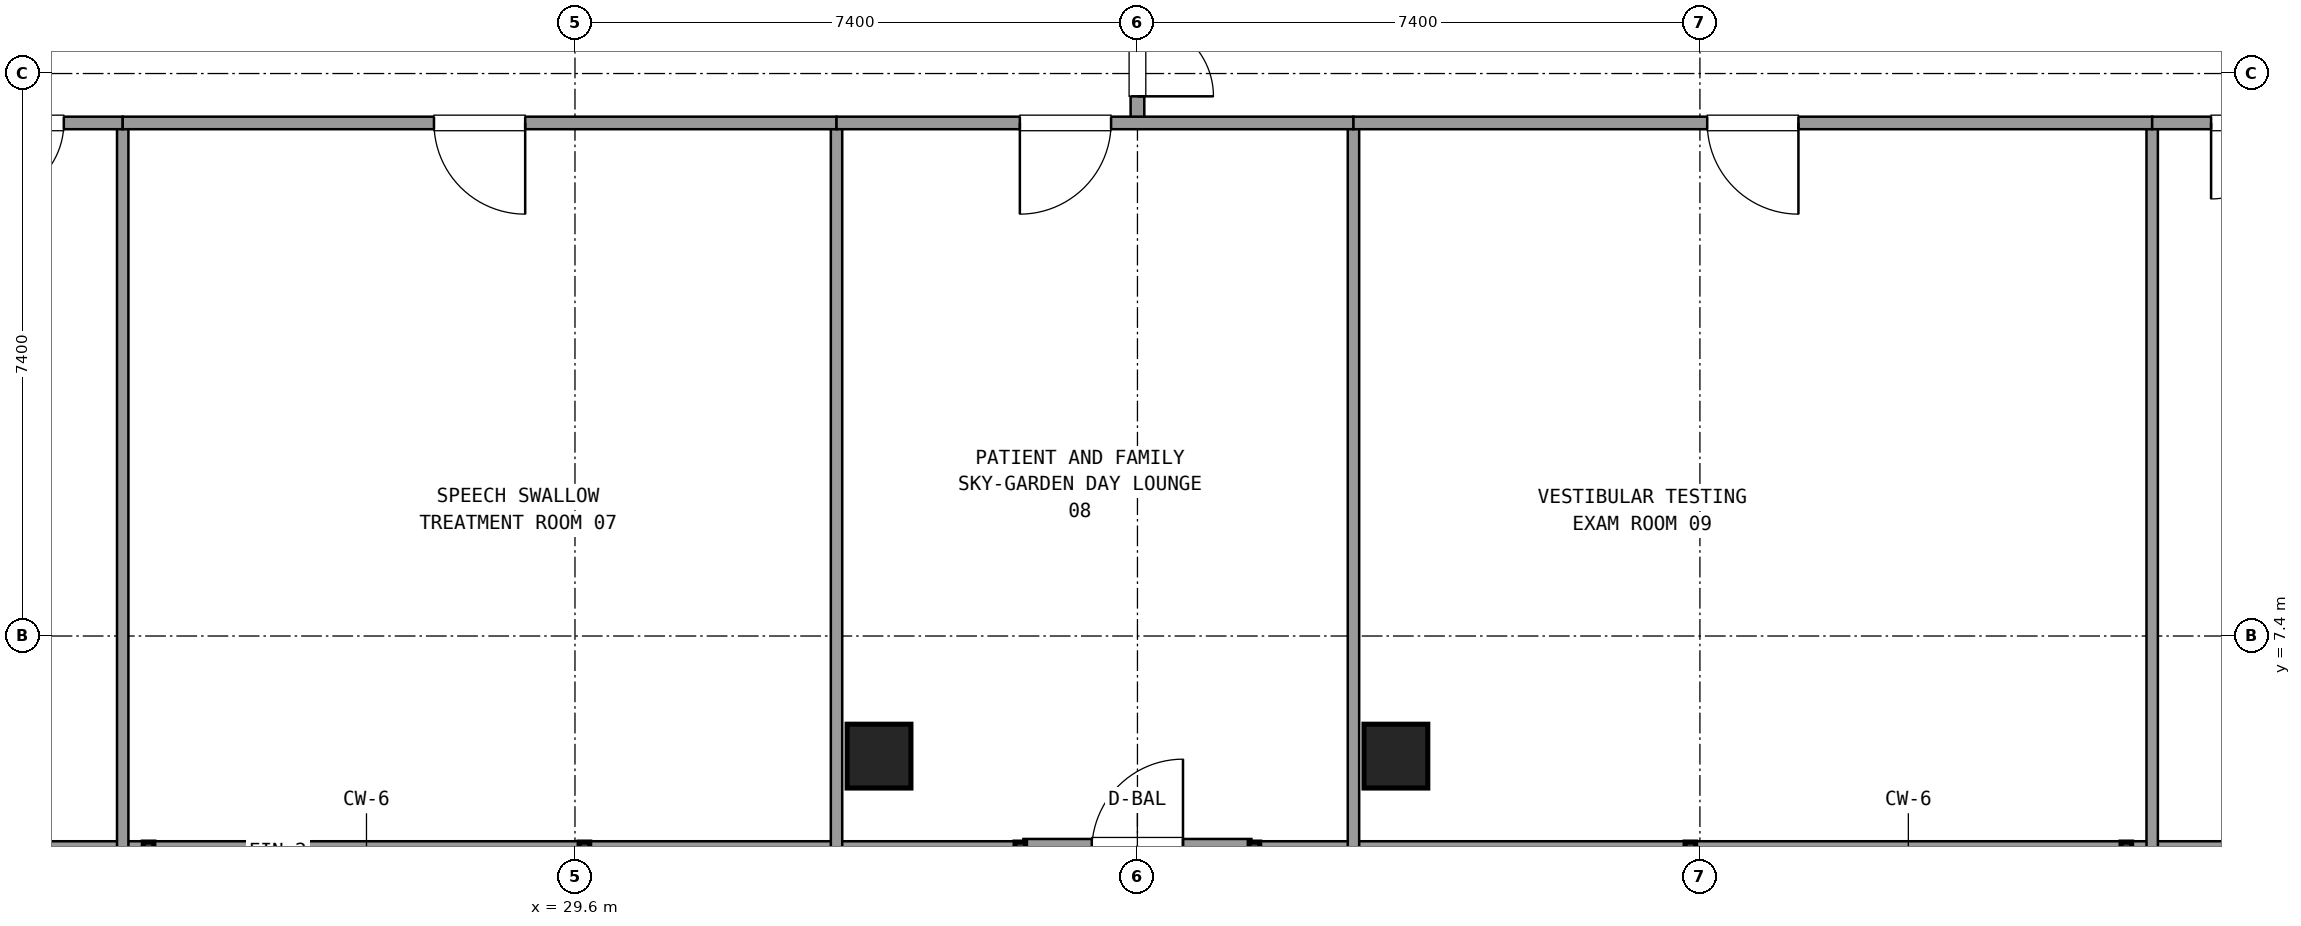
"""IFC4 building model, lengths in metres.
Left out: names, types, materials, properties, quantities, classifications, styles, units other than length and angle.
Written with IfcOpenShell. Run it as: python <this file> out.ifc"""

import sys

from ifc_helpers import new_model, si_unit, direction, frame, frame_2d, origin, origin_2d, place, context, subcontext, project, spatial, rectangle, extrude, element, fill, save


model = new_model("IFC4")
c1 = context("Model", 3, precision=1e-05, world=origin(), true_north=direction((0.0, 1.0)))
c2 = subcontext(c1, "Body", "Model", "MODEL_VIEW")
j1 = project(units=[si_unit("LENGTHUNIT", "METRE"), si_unit("PLANEANGLEUNIT", "RADIAN")], contexts=[c1])
p1 = place(None, origin())
s1 = spatial("IfcSite", under=j1, at=p1, CompositionType="ELEMENT")
p2 = place(p1, origin())
s2 = spatial("IfcBuilding", under=s1, at=p2, CompositionType="ELEMENT")
p3 = place(p2, frame((0.0, 0.0, 253.62)))
s3 = spatial("IfcBuildingStorey", under=s2, at=p3, CompositionType="ELEMENT", Elevation=253.62)
for number, where, z_axis, x_axis in (
    (1, (33.6, 5.82, 0.0), (0.0, 0.0, 1.0), (1.0, 0.0, 0.0)),
    (2, (40.4, 5.82, 0.0), (0.0, 0.0, 1.0), (1.0, 0.0, 0.0)),
):
    element("IfcColumn", number, at=place(p3, frame(where, z_axis=z_axis, x_axis=x_axis)), inside=s3, PredefinedType="COLUMN", context=c2, shape_type="SweptSolid", body=[
        extrude(rectangle(XDim=0.84, YDim=0.84, at=origin_2d()), origin(), (0.0, 0.0, 1.0), 3.6),
    ])
p4 = place(p3, frame((35.499, 4.58, 0.0), z_axis=(0.0, 0.0, 1.0), x_axis=(1.0, 0.0, 0.0)))
e3 = element("IfcWall", 3, at=p4, inside=s3, PredefinedType="SOLIDWALL", context=c2, shape_type="SweptSolid", body=[
    extrude(rectangle(XDim=3.0, YDim=0.3, at=frame_2d((1.5, 0.0))), origin(), (0.0, 0.0, 1.0), 2.69),
])
p5 = place(p4, frame((0.9, 0.0, 0.0)))
e4 = element("IfcOpeningElement", 4, at=p5, cuts=e3, PredefinedType="OPENING", context=c2, shape_type="SweptSolid", body=[
    extrude(rectangle(XDim=1.2, YDim=2.2, at=frame_2d((0.6, 1.1))), frame((0.0, 0.16, 0.0), z_axis=(0.0, -1.0, 0.0), x_axis=(1.0, 0.0, 0.0)), (0.0, 0.0, 1.0), 0.32),
])
p6 = place(p3, frame((18.255, 4.58, 0.0), z_axis=(0.0, 0.0, 1.0), x_axis=(1.0, 0.0, 0.0)))
e5 = element("IfcWall", 5, at=p6, inside=s3, PredefinedType="SOLIDWALL", context=c2, shape_type="SweptSolid", body=[
    extrude(rectangle(XDim=17.204, YDim=0.24, at=frame_2d((8.602, 0.0))), origin(), (0.0, 0.0, 1.0), 0.85),
])
p7 = place(p3, frame((38.539, 4.58, 0.0), z_axis=(0.0, 0.0, 1.0), x_axis=(1.0, 0.0, 0.0)))
e6 = element("IfcWall", 6, at=p7, inside=s3, PredefinedType="SOLIDWALL", context=c2, shape_type="SweptSolid", body=[
    extrude(rectangle(XDim=17.206, YDim=0.24, at=frame_2d((8.603, 0.0))), origin(), (0.0, 0.0, 1.0), 0.85),
])
p8 = place(p3, frame((37.0, 14.15, 0.0), z_axis=(0.0, 0.0, 1.0), x_axis=(0.0, 1.0, 0.0)))
e7 = element("IfcWall", 7, at=p8, inside=s3, PredefinedType="PARTITIONING", context=c2, shape_type="SweptSolid", body=[
    extrude(rectangle(XDim=2.7, YDim=0.18, at=frame_2d((1.35, 0.0))), origin(), (0.0, 0.0, 1.0), 2.61),
])
p9 = place(p8, frame((0.35, 0.0, 0.0)))
e8 = element("IfcOpeningElement", 8, at=p9, cuts=e7, PredefinedType="OPENING", context=c2, shape_type="SweptSolid", body=[
    extrude(rectangle(XDim=2.0, YDim=2.2, at=frame_2d((1.0, 1.1))), frame((0.0, 0.1, 0.0), z_axis=(0.0, -1.0, 0.0), x_axis=(1.0, 0.0, 0.0)), (0.0, 0.0, 1.0), 0.2),
])
p10 = place(p3, frame((23.65, 14.15, 0.0), z_axis=(0.0, 0.0, 1.0), x_axis=(0.0, -1.0, 0.0)))
e9 = element("IfcWall", 9, at=p10, inside=s3, PredefinedType="PARTITIONING", context=c2, shape_type="SweptSolid", body=[
    extrude(rectangle(XDim=9.55, YDim=0.15, at=frame_2d((4.775, 0.0))), origin(), (0.0, 0.0, 1.0), 2.61),
])
p11 = place(p3, frame((21.1, 14.15, 0.0), z_axis=(0.0, 0.0, 1.0), x_axis=(1.0, 0.0, 0.0)))
e10 = element("IfcWall", 10, at=p11, inside=s3, PredefinedType="PARTITIONING", context=c2, shape_type="SweptSolid", body=[
    extrude(rectangle(XDim=2.55, YDim=0.165, at=frame_2d((1.275, 0.0))), origin(), (0.0, 0.0, 1.0), 2.61),
])
p12 = place(p11, frame((0.775, 0.0, 0.0)))
e11 = element("IfcOpeningElement", 11, at=p12, cuts=e10, PredefinedType="OPENING", context=c2, shape_type="SweptSolid", body=[
    extrude(rectangle(XDim=1.0, YDim=2.15, at=frame_2d((0.5, 1.075))), frame((0.0, 0.093, 0.0), z_axis=(0.0, -1.0, 0.0), x_axis=(1.0, 0.0, 0.0)), (0.0, 0.0, 1.0), 0.185),
])
p13 = place(p3, frame((33.041, 14.15, 0.0), z_axis=(0.0, 0.0, 1.0), x_axis=(0.0, -1.0, 0.0)))
e12 = element("IfcWall", 12, at=p13, inside=s3, PredefinedType="PARTITIONING", context=c2, shape_type="SweptSolid", body=[
    extrude(rectangle(XDim=9.55, YDim=0.15, at=frame_2d((4.775, 0.0))), origin(), (0.0, 0.0, 1.0), 2.61),
])
p14 = place(p3, frame((23.65, 14.15, 0.0), z_axis=(0.0, 0.0, 1.0), x_axis=(1.0, 0.0, 0.0)))
e13 = element("IfcWall", 13, at=p14, inside=s3, PredefinedType="PARTITIONING", context=c2, shape_type="SweptSolid", body=[
    extrude(rectangle(XDim=9.391, YDim=0.165, at=frame_2d((4.696, 0.0))), origin(), (0.0, 0.0, 1.0), 2.61),
])
p15 = place(p14, frame((4.095, 0.0, 0.0)))
e14 = element("IfcOpeningElement", 14, at=p15, cuts=e13, PredefinedType="OPENING", context=c2, shape_type="SweptSolid", body=[
    extrude(rectangle(XDim=1.2, YDim=2.15, at=frame_2d((0.6, 1.075))), frame((0.0, 0.093, 0.0), z_axis=(0.0, -1.0, 0.0), x_axis=(1.0, 0.0, 0.0)), (0.0, 0.0, 1.0), 0.185),
])
p16 = place(p3, frame((39.842, 14.15, 0.0), z_axis=(0.0, 0.0, 1.0), x_axis=(0.0, -1.0, 0.0)))
e15 = element("IfcWall", 15, at=p16, inside=s3, PredefinedType="PARTITIONING", context=c2, shape_type="SweptSolid", body=[
    extrude(rectangle(XDim=9.55, YDim=0.15, at=frame_2d((4.775, 0.0))), origin(), (0.0, 0.0, 1.0), 2.61),
])
p17 = place(p3, frame((33.041, 14.15, 0.0), z_axis=(0.0, 0.0, 1.0), x_axis=(1.0, 0.0, 0.0)))
e16 = element("IfcWall", 16, at=p17, inside=s3, PredefinedType="PARTITIONING", context=c2, shape_type="SweptSolid", body=[
    extrude(rectangle(XDim=6.801, YDim=0.165, at=frame_2d((3.4, 0.0))), origin(), (0.0, 0.0, 1.0), 2.61),
])
p18 = place(p17, frame((2.412, 0.0, 0.0)))
e17 = element("IfcOpeningElement", 17, at=p18, cuts=e16, PredefinedType="OPENING", context=c2, shape_type="SweptSolid", body=[
    extrude(rectangle(XDim=1.2, YDim=2.15, at=frame_2d((0.6, 1.075))), frame((0.0, 0.093, 0.0), z_axis=(0.0, -1.0, 0.0), x_axis=(1.0, 0.0, 0.0)), (0.0, 0.0, 1.0), 0.185),
])
p19 = place(p3, frame((50.35, 14.15, 0.0), z_axis=(0.0, 0.0, 1.0), x_axis=(0.0, -1.0, 0.0)))
e18 = element("IfcWall", 18, at=p19, inside=s3, PredefinedType="PARTITIONING", context=c2, shape_type="SweptSolid", body=[
    extrude(rectangle(XDim=9.55, YDim=0.15, at=frame_2d((4.775, 0.0))), origin(), (0.0, 0.0, 1.0), 2.61),
])
p20 = place(p3, frame((39.842, 14.15, 0.0), z_axis=(0.0, 0.0, 1.0), x_axis=(1.0, 0.0, 0.0)))
e19 = element("IfcWall", 19, at=p20, inside=s3, PredefinedType="PARTITIONING", context=c2, shape_type="SweptSolid", body=[
    extrude(rectangle(XDim=10.508, YDim=0.165, at=frame_2d((5.254, 0.0))), origin(), (0.0, 0.0, 1.0), 2.61),
])
p21 = place(p20, frame((4.654, 0.0, 0.0)))
e20 = element("IfcOpeningElement", 20, at=p21, cuts=e19, PredefinedType="OPENING", context=c2, shape_type="SweptSolid", body=[
    extrude(rectangle(XDim=1.2, YDim=2.15, at=frame_2d((0.6, 1.075))), frame((0.0, 0.093, 0.0), z_axis=(0.0, -1.0, 0.0), x_axis=(1.0, 0.0, 0.0)), (0.0, 0.0, 1.0), 0.185),
])
p22 = place(p3, frame((50.35, 14.15, 0.0), z_axis=(0.0, 0.0, 1.0), x_axis=(1.0, 0.0, 0.0)))
e21 = element("IfcWall", 21, at=p22, inside=s3, PredefinedType="PARTITIONING", context=c2, shape_type="SweptSolid", body=[
    extrude(rectangle(XDim=2.55, YDim=0.165, at=frame_2d((1.275, 0.0))), origin(), (0.0, 0.0, 1.0), 2.61),
])
p23 = place(p22, frame((0.775, 0.0, 0.0)))
e22 = element("IfcOpeningElement", 22, at=p23, cuts=e21, PredefinedType="OPENING", context=c2, shape_type="SweptSolid", body=[
    extrude(rectangle(XDim=1.0, YDim=2.15, at=frame_2d((0.5, 1.075))), frame((0.0, 0.093, 0.0), z_axis=(0.0, -1.0, 0.0), x_axis=(1.0, 0.0, 0.0)), (0.0, 0.0, 1.0), 0.185),
])
p24 = place(p9, frame((2.0, 0.0, 0.0), z_axis=(0.0, 0.0, 1.0), x_axis=(-1.0, 0.0, 0.0)))
e23 = element("IfcDoor", 23, at=p24, inside=s3, OperationType="DOUBLE_DOOR_SINGLE_SWING", PredefinedType="DOOR", context=c2, shape_type="SweptSolid", body=[
    extrude(rectangle(XDim=2.0, YDim=2.2, at=frame_2d((1.0, 1.1))), frame((0.0, 0.025, 0.0), z_axis=(0.0, -1.0, 0.0), x_axis=(1.0, 0.0, 0.0)), (0.0, 0.0, 1.0), 0.05),
])
fill(e8, e23)
p25 = place(p12, frame((1.0, 0.0, 0.0), z_axis=(0.0, 0.0, 1.0), x_axis=(-1.0, 0.0, 0.0)))
e24 = element("IfcDoor", 24, at=p25, inside=s3, OperationType="SINGLE_SWING_LEFT", PredefinedType="DOOR", context=c2, shape_type="SweptSolid", body=[
    extrude(rectangle(XDim=1.0, YDim=2.15, at=frame_2d((0.5, 1.075))), frame((0.0, 0.025, 0.0), z_axis=(0.0, -1.0, 0.0), x_axis=(1.0, 0.0, 0.0)), (0.0, 0.0, 1.0), 0.05),
])
fill(e11, e24)
p26 = place(p15, frame((1.2, 0.0, 0.0), z_axis=(0.0, 0.0, 1.0), x_axis=(-1.0, 0.0, 0.0)))
e25 = element("IfcDoor", 25, at=p26, inside=s3, OperationType="SINGLE_SWING_RIGHT", PredefinedType="DOOR", context=c2, shape_type="SweptSolid", body=[
    extrude(rectangle(XDim=1.2, YDim=2.15, at=frame_2d((0.6, 1.075))), frame((0.0, 0.025, 0.0), z_axis=(0.0, -1.0, 0.0), x_axis=(1.0, 0.0, 0.0)), (0.0, 0.0, 1.0), 0.05),
])
fill(e14, e25)
p27 = place(p18, frame((1.2, 0.0, 0.0), z_axis=(0.0, 0.0, 1.0), x_axis=(-1.0, 0.0, 0.0)))
e26 = element("IfcDoor", 26, at=p27, inside=s3, OperationType="SINGLE_SWING_LEFT", PredefinedType="DOOR", context=c2, shape_type="SweptSolid", body=[
    extrude(rectangle(XDim=1.2, YDim=2.15, at=frame_2d((0.6, 1.075))), frame((0.0, 0.025, 0.0), z_axis=(0.0, -1.0, 0.0), x_axis=(1.0, 0.0, 0.0)), (0.0, 0.0, 1.0), 0.05),
])
fill(e17, e26)
p28 = place(p21, frame((1.2, 0.0, 0.0), z_axis=(0.0, 0.0, 1.0), x_axis=(-1.0, 0.0, 0.0)))
e27 = element("IfcDoor", 27, at=p28, inside=s3, OperationType="SINGLE_SWING_RIGHT", PredefinedType="DOOR", context=c2, shape_type="SweptSolid", body=[
    extrude(rectangle(XDim=1.2, YDim=2.15, at=frame_2d((0.6, 1.075))), frame((0.0, 0.025, 0.0), z_axis=(0.0, -1.0, 0.0), x_axis=(1.0, 0.0, 0.0)), (0.0, 0.0, 1.0), 0.05),
])
fill(e20, e27)
p29 = place(p23, frame((1.0, 0.0, 0.0), z_axis=(0.0, 0.0, 1.0), x_axis=(-1.0, 0.0, 0.0)))
e28 = element("IfcDoor", 28, at=p29, inside=s3, OperationType="SINGLE_SWING_LEFT", PredefinedType="DOOR", context=c2, shape_type="SweptSolid", body=[
    extrude(rectangle(XDim=1.0, YDim=2.15, at=frame_2d((0.5, 1.075))), frame((0.0, 0.025, 0.0), z_axis=(0.0, -1.0, 0.0), x_axis=(1.0, 0.0, 0.0)), (0.0, 0.0, 1.0), 0.05),
])
fill(e22, e28)
save(model, sys.argv[1])
